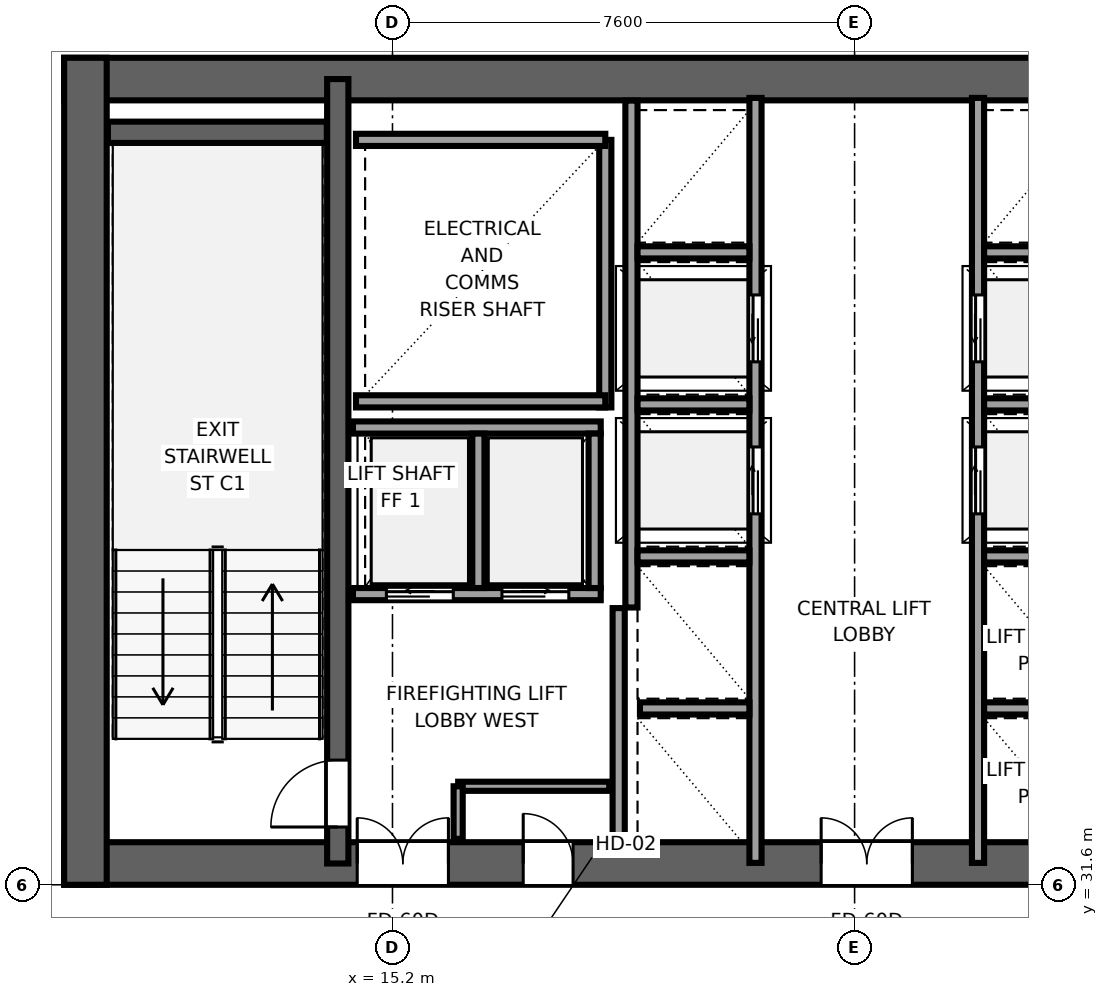
"""IFC4 building model, lengths in metres.
Left out: names, types, materials, properties, quantities, classifications, styles, units other than length and angle.
Written with IfcOpenShell. Run it as: python <this file> out.ifc"""

import sys

from ifc_helpers import new_model, si_unit, direction, frame, frame_2d, origin, place, context, subcontext, project, spatial, rectangle, extrude, source, transform, mapped, element, fill, save


model = new_model("IFC4")
c1 = context("Model", 3, precision=1e-05, world=origin(), true_north=direction((0.0, 1.0)))
c2 = subcontext(c1, "Body", "Model", "MODEL_VIEW")
j1 = project(units=[si_unit("LENGTHUNIT", "METRE"), si_unit("PLANEANGLEUNIT", "RADIAN")], contexts=[c1])
p1 = place(None, origin())
s1 = spatial("IfcSite", under=j1, at=p1, CompositionType="ELEMENT")
p2 = place(p1, origin())
s2 = spatial("IfcBuilding", under=s1, at=p2, CompositionType="ELEMENT")
p3 = place(p2, frame((0.0, 0.0, 179.0)))
s3 = spatial("IfcBuildingStorey", under=s2, at=p3, CompositionType="ELEMENT", Elevation=179.0)
p4 = place(p3, frame((9.8, 31.95, 0.0), z_axis=(0.0, 0.0, 1.0), x_axis=(1.0, 0.0, 0.0)))
e1 = element("IfcWall", 1, at=p4, inside=s3, PredefinedType="SHEAR", context=c2, shape_type="SweptSolid", body=[
    extrude(rectangle(XDim=26.4, YDim=0.7, at=frame_2d((13.2, 0.0))), origin(), (0.0, 0.0, 1.0), 3.55),
])
p5 = place(p4, frame((6.32, 0.0, 0.0), z_axis=(0.0, 0.0, 1.0), x_axis=(-1.0, 0.0, 0.0)))
e2 = element("IfcOpeningElement", 2, at=p5, cuts=e1, PredefinedType="OPENING", context=c2, shape_type="SweptSolid", body=[
    extrude(rectangle(XDim=1.5, YDim=2.04, at=frame_2d((0.75, 1.02))), frame((0.0, 0.36, 0.0), z_axis=(0.0, -1.0, 0.0), x_axis=(1.0, 0.0, 0.0)), (0.0, 0.0, 1.0), 0.72),
])
p6 = place(p4, frame((13.95, 0.0, 0.0), z_axis=(0.0, 0.0, 1.0), x_axis=(-1.0, 0.0, 0.0)))
e3 = element("IfcOpeningElement", 3, at=p6, cuts=e1, PredefinedType="OPENING", context=c2, shape_type="SweptSolid", body=[
    extrude(rectangle(XDim=1.5, YDim=2.04, at=frame_2d((0.75, 1.02))), frame((0.0, 0.36, 0.0), z_axis=(0.0, -1.0, 0.0), x_axis=(1.0, 0.0, 0.0)), (0.0, 0.0, 1.0), 0.72),
])
p7 = place(p4, frame((21.58, 0.0, 0.0), z_axis=(0.0, 0.0, 1.0), x_axis=(-1.0, 0.0, 0.0)))
e4 = element("IfcOpeningElement", 4, at=p7, cuts=e1, PredefinedType="OPENING", context=c2, shape_type="SweptSolid", body=[
    extrude(rectangle(XDim=1.5, YDim=2.04, at=frame_2d((0.75, 1.02))), frame((0.0, 0.36, 0.0), z_axis=(0.0, -1.0, 0.0), x_axis=(1.0, 0.0, 0.0)), (0.0, 0.0, 1.0), 0.72),
])
p8 = place(p4, frame((8.37, 0.0, 0.0), z_axis=(0.0, 0.0, 1.0), x_axis=(-1.0, 0.0, 0.0)))
e5 = element("IfcOpeningElement", 5, at=p8, cuts=e1, PredefinedType="OPENING", context=c2, shape_type="SweptSolid", body=[
    extrude(rectangle(XDim=0.82, YDim=2.01, at=frame_2d((0.41, 1.005))), frame((0.0, 0.36, 0.0), z_axis=(0.0, -1.0, 0.0), x_axis=(1.0, 0.0, 0.0)), (0.0, 0.0, 1.0), 0.72),
])
p9 = place(p4, frame((18.87, 0.0, 0.0), z_axis=(0.0, 0.0, 1.0), x_axis=(-1.0, 0.0, 0.0)))
e6 = element("IfcOpeningElement", 6, at=p9, cuts=e1, PredefinedType="OPENING", context=c2, shape_type="SweptSolid", body=[
    extrude(rectangle(XDim=0.82, YDim=2.01, at=frame_2d((0.41, 1.005))), frame((0.0, 0.36, 0.0), z_axis=(0.0, -1.0, 0.0), x_axis=(1.0, 0.0, 0.0)), (0.0, 0.0, 1.0), 0.72),
])
p10 = place(p3, frame((9.8, 44.85, 0.0), z_axis=(0.0, 0.0, 1.0), x_axis=(1.0, 0.0, 0.0)))
e7 = element("IfcWall", 7, at=p10, inside=s3, PredefinedType="SHEAR", context=c2, shape_type="SweptSolid", body=[
    extrude(rectangle(XDim=26.4, YDim=0.7, at=frame_2d((13.2, 0.0))), origin(), (0.0, 0.0, 1.0), 3.55),
])
p11 = place(p3, frame((10.15, 31.6, 0.0), z_axis=(0.0, 0.0, 1.0), x_axis=(0.0, 1.0, 0.0)))
e8 = element("IfcWall", 8, at=p11, inside=s3, PredefinedType="SHEAR", context=c2, shape_type="SweptSolid", body=[
    extrude(rectangle(XDim=13.6, YDim=0.7, at=frame_2d((6.8, 0.0))), origin(), (0.0, 0.0, 1.0), 3.55),
])
p12 = place(p3, frame((14.3, 31.95, 0.0), z_axis=(0.0, 0.0, 1.0), x_axis=(0.0, 1.0, 0.0)))
e9 = element("IfcWall", 9, at=p12, inside=s3, PredefinedType="SHEAR", context=c2, shape_type="SweptSolid", body=[
    extrude(rectangle(XDim=12.9, YDim=0.35, at=frame_2d((6.45, 0.0))), origin(), (0.0, 0.0, 1.0), 3.55),
])
p13 = place(p12, frame((0.6, 0.0, 0.0)))
e10 = element("IfcOpeningElement", 10, at=p13, cuts=e9, PredefinedType="OPENING", context=c2, shape_type="SweptSolid", body=[
    extrude(rectangle(XDim=1.1, YDim=2.12, at=frame_2d((0.55, 1.06))), frame((0.0, 0.185, 0.0), z_axis=(0.0, -1.0, 0.0), x_axis=(1.0, 0.0, 0.0)), (0.0, 0.0, 1.0), 0.37),
])
p14 = place(p3, frame((10.52, 43.975, 0.0), z_axis=(0.0, 0.0, 1.0), x_axis=(1.0, 0.0, 0.0)))
e11 = element("IfcWall", 11, at=p14, inside=s3, PredefinedType="SHEAR", context=c2, shape_type="SweptSolid", body=[
    extrude(rectangle(XDim=3.6, YDim=0.35, at=frame_2d((1.8, 0.0))), origin(), (0.0, 0.0, 1.0), 3.55),
])
p15 = place(p3, frame((18.7, 39.45, 0.0), z_axis=(0.0, 0.0, 1.0), x_axis=(0.0, 1.0, 0.0)))
e12 = element("IfcWall", 12, at=p15, inside=s3, PredefinedType="SOLIDWALL", context=c2, shape_type="SweptSolid", body=[
    extrude(rectangle(XDim=4.4, YDim=0.2, at=frame_2d((2.2, 0.0))), origin(), (0.0, 0.0, 1.0), 3.25),
])
for number, where, z_axis, x_axis in (
    (13, (14.6, 39.55, 0.0), (0.0, 0.0, 1.0), (1.0, 0.0, 0.0)),
    (14, (14.6, 43.85, 0.0), (0.0, 0.0, 1.0), (1.0, 0.0, 0.0)),
):
    element("IfcWall", number, at=place(p3, frame(where, z_axis=z_axis, x_axis=x_axis)), inside=s3, PredefinedType="SOLIDWALL", context=c2, shape_type="SweptSolid", body=[
        extrude(rectangle(XDim=4.1, YDim=0.2, at=frame_2d((2.05, 0.0))), origin(), (0.0, 0.0, 1.0), 3.25),
    ])
p16 = place(p3, frame((18.92, 32.304, 0.0), z_axis=(0.0, 0.0, 1.0), x_axis=(0.0, 1.0, 0.0)))
e15 = element("IfcWall", 15, at=p16, inside=s3, PredefinedType="SOLIDWALL", context=c2, shape_type="SweptSolid", body=[
    extrude(rectangle(XDim=3.846, YDim=0.2, at=frame_2d((1.923, 0.0))), origin(), (0.0, 0.0, 1.0), 3.25),
])
p17 = place(p3, frame((21.17, 31.96, 0.0), z_axis=(0.0, 0.0, 1.0), x_axis=(0.0, 1.0, 0.0)))
e16 = element("IfcWall", 16, at=p17, inside=s3, PredefinedType="SOLIDWALL", context=c2, shape_type="SweptSolid", body=[
    extrude(rectangle(XDim=12.58, YDim=0.2, at=frame_2d((6.29, 0.0))), origin(), (0.0, 0.0, 1.0), 3.25),
])
p18 = place(p17, frame((5.74, 0.0, 0.0)))
e17 = element("IfcOpeningElement", 17, at=p18, cuts=e16, PredefinedType="OPENING", context=c2, shape_type="SweptSolid", body=[
    extrude(rectangle(XDim=1.1, YDim=2.12, at=frame_2d((0.55, 1.06))), frame((0.0, 0.11, 0.0), z_axis=(0.0, -1.0, 0.0), x_axis=(1.0, 0.0, 0.0)), (0.0, 0.0, 1.0), 0.22),
])
p19 = place(p17, frame((8.24, 0.0, 0.0)))
e18 = element("IfcOpeningElement", 18, at=p19, cuts=e16, PredefinedType="OPENING", context=c2, shape_type="SweptSolid", body=[
    extrude(rectangle(XDim=1.1, YDim=2.12, at=frame_2d((0.55, 1.06))), frame((0.0, 0.11, 0.0), z_axis=(0.0, -1.0, 0.0), x_axis=(1.0, 0.0, 0.0)), (0.0, 0.0, 1.0), 0.22),
])
p20 = place(p3, frame((19.13, 36.16, 0.0), z_axis=(0.0, 0.0, 1.0), x_axis=(0.0, 1.0, 0.0)))
e19 = element("IfcWall", 19, at=p20, inside=s3, PredefinedType="SOLIDWALL", context=c2, shape_type="SweptSolid", body=[
    extrude(rectangle(XDim=8.336, YDim=0.2, at=frame_2d((4.168, 0.0))), origin(), (0.0, 0.0, 1.0), 3.25),
])
p21 = place(p3, frame((19.27, 34.5, 0.0), z_axis=(0.0, 0.0, 1.0), x_axis=(1.0, 0.0, 0.0)))
e20 = element("IfcWall", 20, at=p21, inside=s3, PredefinedType="SOLIDWALL", context=c2, shape_type="SweptSolid", body=[
    extrude(rectangle(XDim=1.8, YDim=0.2, at=frame_2d((0.9, 0.0))), origin(), (0.0, 0.0, 1.0), 3.25),
])
for number, where, z_axis, x_axis in (
    (21, (19.23, 37.0, 0.0), (0.0, 0.0, 1.0), (1.0, 0.0, 0.0)),
    (22, (19.23, 39.5, 0.0), (0.0, 0.0, 1.0), (1.0, 0.0, 0.0)),
    (23, (19.23, 42.0, 0.0), (0.0, 0.0, 1.0), (1.0, 0.0, 0.0)),
):
    element("IfcWall", number, at=place(p3, frame(where, z_axis=z_axis, x_axis=x_axis)), inside=s3, PredefinedType="SOLIDWALL", context=c2, shape_type="SweptSolid", body=[
        extrude(rectangle(XDim=1.84, YDim=0.2, at=frame_2d((0.92, 0.0))), origin(), (0.0, 0.0, 1.0), 3.25),
    ])
p22 = place(p3, frame((14.55, 36.38, 0.0), z_axis=(0.0, 0.0, 1.0), x_axis=(1.0, 0.0, 0.0)))
e24 = element("IfcWall", 24, at=p22, inside=s3, PredefinedType="SOLIDWALL", context=c2, shape_type="SweptSolid", body=[
    extrude(rectangle(XDim=4.075, YDim=0.2, at=frame_2d((2.038, 0.0))), origin(), (0.0, 0.0, 1.0), 3.25),
])
p23 = place(p22, frame((0.55, 0.0, 0.0)))
e25 = element("IfcOpeningElement", 25, at=p23, cuts=e24, PredefinedType="OPENING", context=c2, shape_type="SweptSolid", body=[
    extrude(rectangle(XDim=1.1, YDim=2.12, at=frame_2d((0.55, 1.06))), frame((0.0, 0.11, 0.0), z_axis=(0.0, -1.0, 0.0), x_axis=(1.0, 0.0, 0.0)), (0.0, 0.0, 1.0), 0.22),
])
p24 = place(p22, frame((2.45, 0.0, 0.0)))
e26 = element("IfcOpeningElement", 26, at=p24, cuts=e24, PredefinedType="OPENING", context=c2, shape_type="SweptSolid", body=[
    extrude(rectangle(XDim=1.1, YDim=2.12, at=frame_2d((0.55, 1.06))), frame((0.0, 0.11, 0.0), z_axis=(0.0, -1.0, 0.0), x_axis=(1.0, 0.0, 0.0)), (0.0, 0.0, 1.0), 0.22),
])
p25 = place(p3, frame((14.55, 39.12, 0.0), z_axis=(0.0, 0.0, 1.0), x_axis=(1.0, 0.0, 0.0)))
e27 = element("IfcWall", 27, at=p25, inside=s3, PredefinedType="SOLIDWALL", context=c2, shape_type="SweptSolid", body=[
    extrude(rectangle(XDim=4.075, YDim=0.2, at=frame_2d((2.038, 0.0))), origin(), (0.0, 0.0, 1.0), 3.25),
])
for number, where, z_axis, x_axis in (
    (28, (18.525, 36.48, 0.0), (0.0, 0.0, 1.0), (0.0, 1.0, 0.0)),
    (29, (16.613, 36.48, 0.0), (0.0, 0.0, 1.0), (0.0, 1.0, 0.0)),
):
    element("IfcWall", number, at=place(p3, frame(where, z_axis=z_axis, x_axis=x_axis)), inside=s3, PredefinedType="SOLIDWALL", context=c2, shape_type="SweptSolid", body=[
        extrude(rectangle(XDim=2.54, YDim=0.2, at=frame_2d((1.27, 0.0))), origin(), (0.0, 0.0, 1.0), 3.25),
    ])
p26 = place(p3, frame((24.83, 31.96, 0.0), z_axis=(0.0, 0.0, 1.0), x_axis=(0.0, 1.0, 0.0)))
e30 = element("IfcWall", 30, at=p26, inside=s3, PredefinedType="SOLIDWALL", context=c2, shape_type="SweptSolid", body=[
    extrude(rectangle(XDim=12.58, YDim=0.2, at=frame_2d((6.29, 0.0))), origin(), (0.0, 0.0, 1.0), 3.25),
])
p27 = place(p26, frame((5.74, 0.0, 0.0)))
e31 = element("IfcOpeningElement", 31, at=p27, cuts=e30, PredefinedType="OPENING", context=c2, shape_type="SweptSolid", body=[
    extrude(rectangle(XDim=1.1, YDim=2.12, at=frame_2d((0.55, 1.06))), frame((0.0, 0.11, 0.0), z_axis=(0.0, -1.0, 0.0), x_axis=(1.0, 0.0, 0.0)), (0.0, 0.0, 1.0), 0.22),
])
p28 = place(p26, frame((8.24, 0.0, 0.0)))
e32 = element("IfcOpeningElement", 32, at=p28, cuts=e30, PredefinedType="OPENING", context=c2, shape_type="SweptSolid", body=[
    extrude(rectangle(XDim=1.1, YDim=2.12, at=frame_2d((0.55, 1.06))), frame((0.0, 0.11, 0.0), z_axis=(0.0, -1.0, 0.0), x_axis=(1.0, 0.0, 0.0)), (0.0, 0.0, 1.0), 0.22),
])
p29 = place(p3, frame((24.93, 34.5, 0.0), z_axis=(0.0, 0.0, 1.0), x_axis=(1.0, 0.0, 0.0)))
e33 = element("IfcWall", 33, at=p29, inside=s3, PredefinedType="SOLIDWALL", context=c2, shape_type="SweptSolid", body=[
    extrude(rectangle(XDim=1.8, YDim=0.2, at=frame_2d((0.9, 0.0))), origin(), (0.0, 0.0, 1.0), 3.25),
])
for number, where, z_axis, x_axis in (
    (34, (24.93, 37.0, 0.0), (0.0, 0.0, 1.0), (1.0, 0.0, 0.0)),
    (35, (24.93, 39.5, 0.0), (0.0, 0.0, 1.0), (1.0, 0.0, 0.0)),
    (36, (24.93, 42.0, 0.0), (0.0, 0.0, 1.0), (1.0, 0.0, 0.0)),
):
    element("IfcWall", number, at=place(p3, frame(where, z_axis=z_axis, x_axis=x_axis)), inside=s3, PredefinedType="SOLIDWALL", context=c2, shape_type="SweptSolid", body=[
        extrude(rectangle(XDim=1.84, YDim=0.2, at=frame_2d((0.92, 0.0))), origin(), (0.0, 0.0, 1.0), 3.25),
    ])
p30 = place(p3, frame((16.28, 33.22, 0.0), z_axis=(0.0, 0.0, 1.0), x_axis=(1.0, 0.0, 0.0)))
e37 = element("IfcWall", 37, at=p30, inside=s3, PredefinedType="PARTITIONING", context=c2, shape_type="SweptSolid", body=[
    extrude(rectangle(XDim=2.485, YDim=0.15, at=frame_2d((1.242, 0.0))), origin(), (0.0, 0.0, 1.0), 3.25),
])
p31 = place(p3, frame((16.28, 32.355, 0.0), z_axis=(0.0, 0.0, 1.0), x_axis=(0.0, 1.0, 0.0)))
e38 = element("IfcWall", 38, at=p31, inside=s3, PredefinedType="PARTITIONING", context=c2, shape_type="SweptSolid", body=[
    extrude(rectangle(XDim=0.865, YDim=0.15, at=frame_2d((0.433, 0.0))), origin(), (0.0, 0.0, 1.0), 3.25),
])
m1 = source(origin(), c2, "Body", "SweptSolid", [
    extrude(rectangle(XDim=1.1, YDim=2.12, at=frame_2d((0.55, 1.06))), frame((0.0, 0.025, 0.0), z_axis=(0.0, -1.0, 0.0), x_axis=(1.0, 0.0, 0.0)), (0.0, 0.0, 1.0), 0.05),
])
p32 = place(p13, origin())
e39 = element("IfcDoor", 39, at=p32, inside=s3, OperationType="SINGLE_SWING_LEFT", PredefinedType="DOOR", context=c2, shape_type="MappedRepresentation", body=[
    mapped(m1, transform((0.0, 0.0, 0.0), x_axis=(1.0, 0.0, 0.0), y_axis=(0.0, 1.0, 0.0), z_axis=(0.0, 0.0, 1.0), scale=1.0)),
])
fill(e10, e39)
m2 = source(origin(), c2, "Body", "SweptSolid", [
    extrude(rectangle(XDim=1.5, YDim=2.04, at=frame_2d((0.75, 1.02))), frame((0.0, 0.025, 0.0), z_axis=(0.0, -1.0, 0.0), x_axis=(1.0, 0.0, 0.0)), (0.0, 0.0, 1.0), 0.05),
])
p33 = place(p5, origin())
e40 = element("IfcDoor", 40, at=p33, inside=s3, OperationType="DOUBLE_DOOR_SINGLE_SWING", PredefinedType="DOOR", context=c2, shape_type="MappedRepresentation", body=[
    mapped(m2, transform((0.0, 0.0, 0.0), x_axis=(1.0, 0.0, 0.0), y_axis=(0.0, 1.0, 0.0), z_axis=(0.0, 0.0, 1.0), scale=1.0)),
])
fill(e2, e40)
p34 = place(p6, origin())
e41 = element("IfcDoor", 41, at=p34, inside=s3, OperationType="DOUBLE_DOOR_SINGLE_SWING", PredefinedType="DOOR", context=c2, shape_type="MappedRepresentation", body=[
    mapped(m2, transform((0.0, 0.0, 0.0), x_axis=(1.0, 0.0, 0.0), y_axis=(0.0, 1.0, 0.0), z_axis=(0.0, 0.0, 1.0), scale=1.0)),
])
fill(e3, e41)
m3 = source(origin(), c2, "Body", "SweptSolid", [
    extrude(rectangle(XDim=0.82, YDim=2.01, at=frame_2d((0.41, 1.005))), frame((0.0, 0.025, 0.0), z_axis=(0.0, -1.0, 0.0), x_axis=(1.0, 0.0, 0.0)), (0.0, 0.0, 1.0), 0.05),
])
p35 = place(p8, origin())
e42 = element("IfcDoor", 42, at=p35, inside=s3, OperationType="SINGLE_SWING_LEFT", PredefinedType="DOOR", context=c2, shape_type="MappedRepresentation", body=[
    mapped(m3, transform((0.0, 0.0, 0.0), x_axis=(1.0, 0.0, 0.0), y_axis=(0.0, 1.0, 0.0), z_axis=(0.0, 0.0, 1.0), scale=1.0)),
])
fill(e5, e42)
m4 = source(origin(), c2, "Body", "SweptSolid", [
    extrude(rectangle(XDim=1.1, YDim=2.12, at=frame_2d((0.55, 1.06))), frame((0.0, 0.025, 0.0), z_axis=(0.0, -1.0, 0.0), x_axis=(1.0, 0.0, 0.0)), (0.0, 0.0, 1.0), 0.05),
])
p36 = place(p18, origin())
e43 = element("IfcDoor", 43, at=p36, inside=s3, OperationType="SLIDING_TO_RIGHT", PredefinedType="DOOR", context=c2, shape_type="MappedRepresentation", body=[
    mapped(m4, transform((0.0, 0.0, 0.0), x_axis=(1.0, 0.0, 0.0), y_axis=(0.0, 1.0, 0.0), z_axis=(0.0, 0.0, 1.0), scale=1.0)),
])
fill(e17, e43)
p37 = place(p19, origin())
e44 = element("IfcDoor", 44, at=p37, inside=s3, OperationType="SLIDING_TO_LEFT", PredefinedType="DOOR", context=c2, shape_type="MappedRepresentation", body=[
    mapped(m4, transform((0.0, 0.0, 0.0), x_axis=(1.0, 0.0, 0.0), y_axis=(0.0, 1.0, 0.0), z_axis=(0.0, 0.0, 1.0), scale=1.0)),
])
fill(e18, e44)
p38 = place(p23, origin())
e45 = element("IfcDoor", 45, at=p38, inside=s3, OperationType="SLIDING_TO_LEFT", PredefinedType="DOOR", context=c2, shape_type="MappedRepresentation", body=[
    mapped(m4, transform((0.0, 0.0, 0.0), x_axis=(1.0, 0.0, 0.0), y_axis=(0.0, 1.0, 0.0), z_axis=(0.0, 0.0, 1.0), scale=1.0)),
])
fill(e25, e45)
p39 = place(p24, origin())
e46 = element("IfcDoor", 46, at=p39, inside=s3, OperationType="SLIDING_TO_RIGHT", PredefinedType="DOOR", context=c2, shape_type="MappedRepresentation", body=[
    mapped(m4, transform((0.0, 0.0, 0.0), x_axis=(1.0, 0.0, 0.0), y_axis=(0.0, 1.0, 0.0), z_axis=(0.0, 0.0, 1.0), scale=1.0)),
])
fill(e26, e46)
p40 = place(p27, origin())
e47 = element("IfcDoor", 47, at=p40, inside=s3, OperationType="SLIDING_TO_RIGHT", PredefinedType="DOOR", context=c2, shape_type="MappedRepresentation", body=[
    mapped(m4, transform((0.0, 0.0, 0.0), x_axis=(1.0, 0.0, 0.0), y_axis=(0.0, 1.0, 0.0), z_axis=(0.0, 0.0, 1.0), scale=1.0)),
])
fill(e31, e47)
p41 = place(p28, origin())
e48 = element("IfcDoor", 48, at=p41, inside=s3, OperationType="SLIDING_TO_LEFT", PredefinedType="DOOR", context=c2, shape_type="MappedRepresentation", body=[
    mapped(m4, transform((0.0, 0.0, 0.0), x_axis=(1.0, 0.0, 0.0), y_axis=(0.0, 1.0, 0.0), z_axis=(0.0, 0.0, 1.0), scale=1.0)),
])
fill(e32, e48)
save(model, sys.argv[1])
